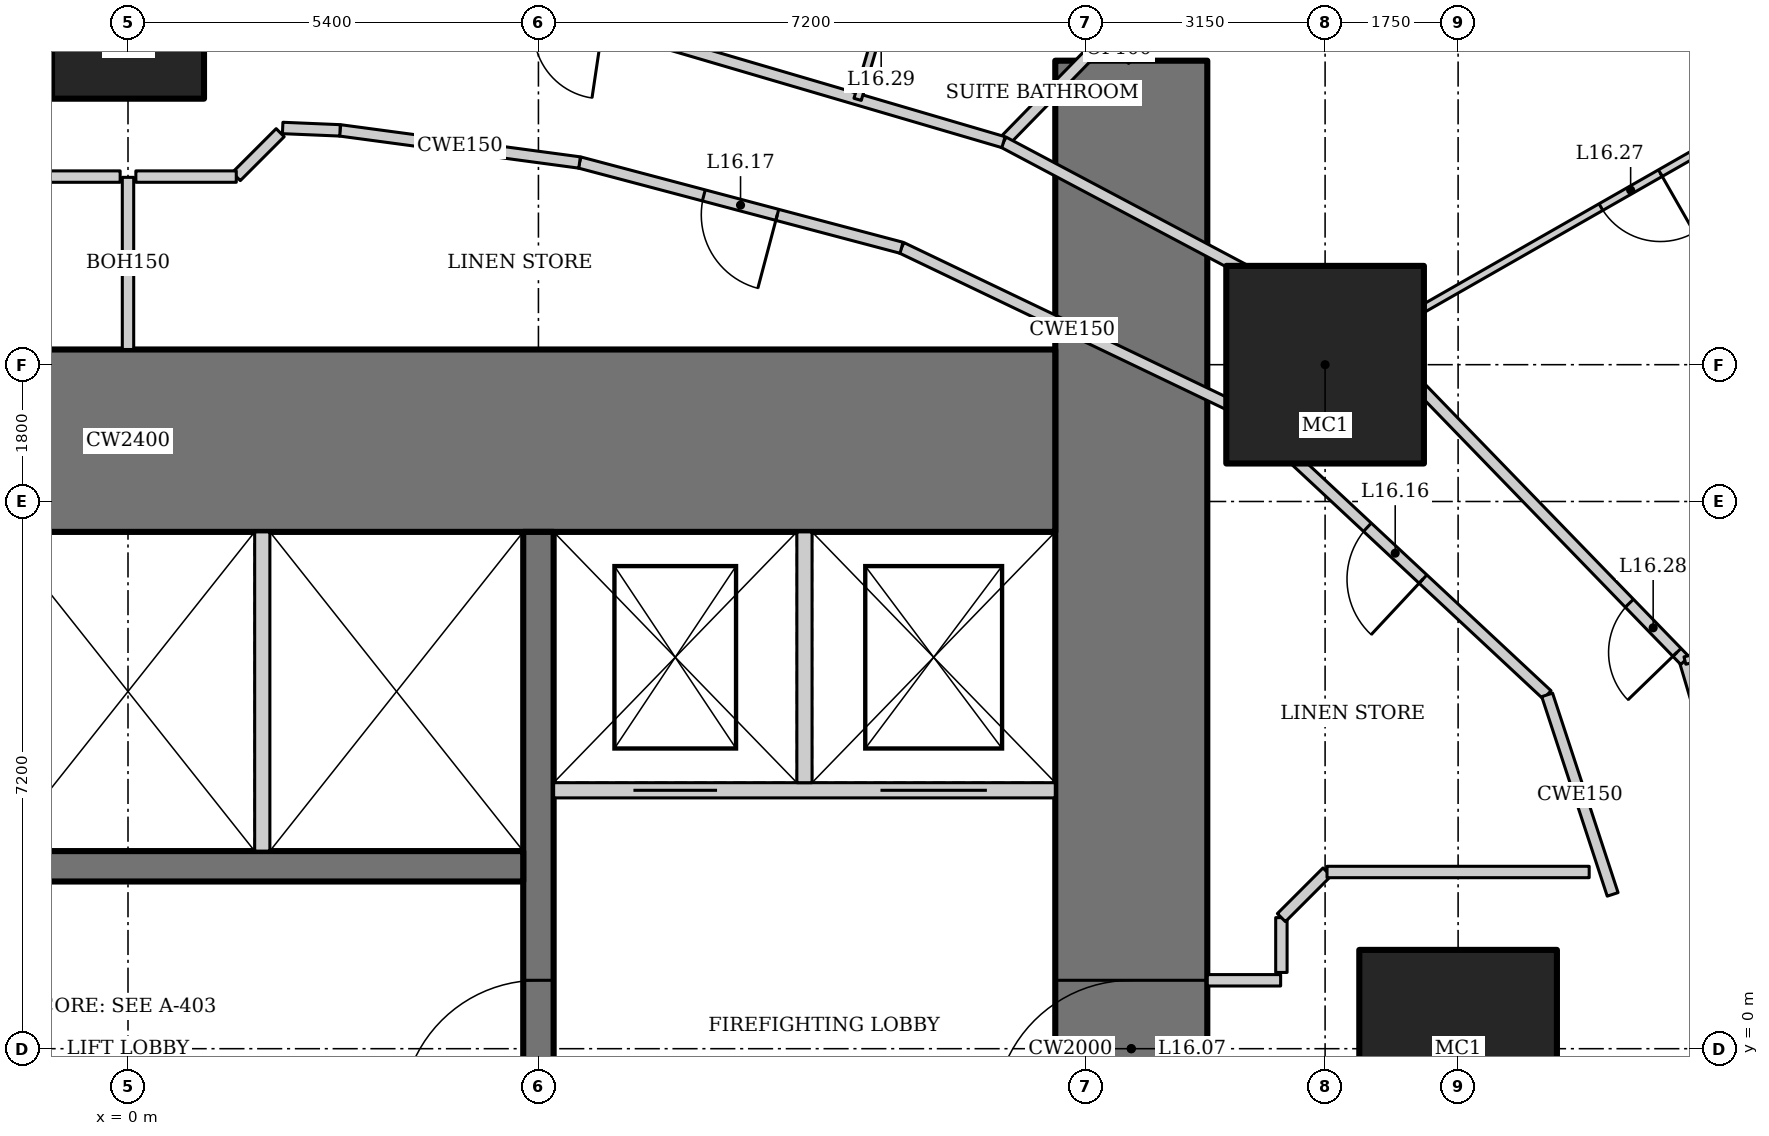
"""IFC4 building model, lengths in metres.
Left out: names, types, materials, properties, quantities, classifications, styles, units other than length and angle.
Written with IfcOpenShell. Run it as: python <this file> out.ifc"""

import sys

from ifc_helpers import new_model, si_unit, direction, frame, frame_2d, origin, origin_2d, place, context, subcontext, project, spatial, rectangle, hollow_rectangle, extrude, element, fill, save


model = new_model("IFC4")
c1 = context("Model", 3, precision=1e-05, world=origin(), true_north=direction((0.0, 1.0)))
c2 = subcontext(c1, "Body", "Model", "MODEL_VIEW")
j1 = project(units=[si_unit("LENGTHUNIT", "METRE"), si_unit("PLANEANGLEUNIT", "RADIAN")], contexts=[c1])
p1 = place(None, origin())
s1 = spatial("IfcSite", under=j1, at=p1, CompositionType="ELEMENT")
p2 = place(p1, origin())
s2 = spatial("IfcBuilding", under=s1, at=p2, CompositionType="ELEMENT")
p3 = place(p2, frame((0.0, 0.0, 73.0)))
s3 = spatial("IfcBuildingStorey", under=s2, at=p3, CompositionType="ELEMENT", Elevation=73.0)
for number, where, z_axis, x_axis in (
    (1, (17.5, 0.0, 0.0), (0.0, 0.0, 1.0), (1.0, 0.0, 0.0)),
    (2, (15.75, 9.0, 0.0), (0.0, 0.0, 1.0), (1.0, 0.0, 0.0)),
):
    element("IfcColumn", number, at=place(p3, frame(where, z_axis=z_axis, x_axis=x_axis)), inside=s3, PredefinedType="COLUMN", context=c2, shape_type="SweptSolid", body=[
        extrude(hollow_rectangle(XDim=2.6, YDim=2.6, WallThickness=0.13, at=origin_2d()), origin(), (0.0, 0.0, 1.0), 3.6),
    ])
p4 = place(p3, frame((0.0, 13.5, 0.0), z_axis=(0.0, 0.0, 1.0), x_axis=(1.0, 0.0, 0.0)))
e3 = element("IfcColumn", 3, at=p4, inside=s3, PredefinedType="COLUMN", context=c2, shape_type="SweptSolid", body=[
    extrude(hollow_rectangle(XDim=2.0, YDim=2.0, WallThickness=0.17, at=origin_2d()), origin(), (0.0, 0.0, 1.0), 3.6),
])
p5 = place(p3, frame((13.2, -13.0, 0.0), z_axis=(0.0, 0.0, 1.0), x_axis=(0.0, 1.0, 0.0)))
e4 = element("IfcWall", 4, at=p5, inside=s3, PredefinedType="SHEAR", context=c2, shape_type="SweptSolid", body=[
    extrude(rectangle(XDim=26.0, YDim=2.0, at=frame_2d((13.0, 0.0))), origin(), (0.0, 0.0, 1.0), 3.6),
])
p6 = place(p5, frame((12.1, 0.0, 0.0)))
e5 = element("IfcOpeningElement", 5, at=p6, cuts=e4, PredefinedType="OPENING", context=c2, shape_type="SweptSolid", body=[
    extrude(rectangle(XDim=1.8, YDim=2.1, at=frame_2d((0.9, 1.05))), frame((0.0, 1.01, 0.0), z_axis=(0.0, -1.0, 0.0), x_axis=(1.0, 0.0, 0.0)), (0.0, 0.0, 1.0), 2.02),
])
p7 = place(p3, frame((12.2, 8.0, 0.0), z_axis=(0.0, 0.0, 1.0), x_axis=(-1.0, 0.0, 0.0)))
e6 = element("IfcWall", 6, at=p7, inside=s3, PredefinedType="SHEAR", context=c2, shape_type="SweptSolid", body=[
    extrude(rectangle(XDim=24.4, YDim=2.4, at=frame_2d((12.2, 0.0))), origin(), (0.0, 0.0, 1.0), 3.6),
])
p8 = place(p3, frame((5.4, -6.8, 0.0), z_axis=(0.0, 0.0, 1.0), x_axis=(0.0, 1.0, 0.0)))
e7 = element("IfcWall", 7, at=p8, inside=s3, PredefinedType="SHEAR", context=c2, shape_type="SweptSolid", body=[
    extrude(rectangle(XDim=13.6, YDim=0.4, at=frame_2d((6.8, 0.0))), origin(), (0.0, 0.0, 1.0), 3.6),
])
p9 = place(p8, frame((5.9, 0.0, 0.0)))
e8 = element("IfcOpeningElement", 8, at=p9, cuts=e7, PredefinedType="OPENING", context=c2, shape_type="SweptSolid", body=[
    extrude(rectangle(XDim=1.8, YDim=2.1, at=frame_2d((0.9, 1.05))), frame((0.0, 0.21, 0.0), z_axis=(0.0, -1.0, 0.0), x_axis=(1.0, 0.0, 0.0)), (0.0, 0.0, 1.0), 0.42),
])
p10 = place(p3, frame((5.2, 2.4, 0.0), z_axis=(0.0, 0.0, 1.0), x_axis=(-1.0, 0.0, 0.0)))
e9 = element("IfcWall", 9, at=p10, inside=s3, PredefinedType="SHEAR", context=c2, shape_type="SweptSolid", body=[
    extrude(rectangle(XDim=10.4, YDim=0.4, at=frame_2d((5.2, 0.0))), origin(), (0.0, 0.0, 1.0), 3.6),
])
p11 = place(p3, frame((1.767, 2.6, 0.0), z_axis=(0.0, 0.0, 1.0), x_axis=(0.0, 1.0, 0.0)))
e10 = element("IfcWall", 10, at=p11, inside=s3, PredefinedType="SOLIDWALL", context=c2, shape_type="SweptSolid", body=[
    extrude(rectangle(XDim=4.2, YDim=0.2, at=frame_2d((2.1, 0.0))), origin(), (0.0, 0.0, 1.0), 3.6),
])
p12 = place(p3, frame((12.2, 3.4, 0.0), z_axis=(0.0, 0.0, 1.0), x_axis=(-1.0, 0.0, 0.0)))
e11 = element("IfcWall", 11, at=p12, inside=s3, PredefinedType="SOLIDWALL", context=c2, shape_type="SweptSolid", body=[
    extrude(rectangle(XDim=6.6, YDim=0.2, at=frame_2d((3.3, 0.0))), origin(), (0.0, 0.0, 1.0), 3.6),
])
p13 = place(p12, frame((4.45, 0.0, 0.0)))
e12 = element("IfcOpeningElement", 12, at=p13, cuts=e11, PredefinedType="OPENING", context=c2, shape_type="SweptSolid", body=[
    extrude(rectangle(XDim=1.1, YDim=2.2, at=frame_2d((0.55, 1.1))), frame((0.0, 0.11, 0.0), z_axis=(0.0, -1.0, 0.0), x_axis=(1.0, 0.0, 0.0)), (0.0, 0.0, 1.0), 0.22),
])
p14 = place(p12, frame((0.9, 0.0, 0.0)))
e13 = element("IfcOpeningElement", 13, at=p14, cuts=e11, PredefinedType="OPENING", context=c2, shape_type="SweptSolid", body=[
    extrude(rectangle(XDim=1.4, YDim=2.2, at=frame_2d((0.7, 1.1))), frame((0.0, 0.11, 0.0), z_axis=(0.0, -1.0, 0.0), x_axis=(1.0, 0.0, 0.0)), (0.0, 0.0, 1.0), 0.22),
])
p15 = place(p3, frame((8.9, 3.5, 0.0), z_axis=(0.0, 0.0, 1.0), x_axis=(0.0, 1.0, 0.0)))
e14 = element("IfcWall", 14, at=p15, inside=s3, PredefinedType="SOLIDWALL", context=c2, shape_type="SweptSolid", body=[
    extrude(rectangle(XDim=3.3, YDim=0.2, at=frame_2d((1.65, 0.0))), origin(), (0.0, 0.0, 1.0), 3.6),
])
p16 = place(p3, frame((17.97, 18.542, 0.0), z_axis=(0.0, 0.0, 1.0), x_axis=(-0.698279935955, -0.715824790743, 0.0)))
e15 = element("IfcWall", 15, at=p16, inside=s3, PredefinedType="PARTITIONING", context=c2, shape_type="SweptSolid", body=[
    extrude(rectangle(XDim=9.24, YDim=0.15, at=frame_2d((4.62, 0.0))), origin(), (0.0, 0.0, 1.0), 2.528),
])
p17 = place(p3, frame((22.0, 0.0, 0.0), z_axis=(0.0, 0.0, 1.0), x_axis=(-0.284584469409, 0.95865096869, 0.0)))
e16 = element("IfcWall", 16, at=p17, inside=s3, PredefinedType="PARTITIONING", context=c2, shape_type="SweptSolid", body=[
    extrude(rectangle(XDim=5.327, YDim=0.15, at=frame_2d((2.664, 0.0))), origin(), (0.0, 0.0, 1.0), 3.45),
])
p18 = place(p3, frame((20.484, 5.107, 0.0), z_axis=(0.0, 0.0, 1.0), x_axis=(-0.695871090686, 0.71816671125, 0.0)))
e17 = element("IfcWall", 17, at=p18, inside=s3, PredefinedType="PARTITIONING", context=c2, shape_type="SweptSolid", body=[
    extrude(rectangle(XDim=5.913, YDim=0.15, at=frame_2d((2.957, 0.0))), origin(), (0.0, 0.0, 1.0), 3.45),
])
p19 = place(p18, frame((0.15, 0.0, 0.0)))
e18 = element("IfcOpeningElement", 18, at=p19, cuts=e17, PredefinedType="OPENING", context=c2, shape_type="SweptSolid", body=[
    extrude(rectangle(XDim=0.9, YDim=2.1, at=frame_2d((0.45, 1.05))), frame((0.0, 0.085, 0.0), z_axis=(0.0, -1.0, 0.0), x_axis=(1.0, 0.0, 0.0)), (0.0, 0.0, 1.0), 0.17),
])
p20 = place(p3, frame((16.369, 9.354, 0.0), z_axis=(0.0, 0.0, 1.0), x_axis=(-0.883334368785, 0.468743419071, 0.0)))
e19 = element("IfcWall", 19, at=p20, inside=s3, PredefinedType="PARTITIONING", context=c2, shape_type="SweptSolid", body=[
    extrude(rectangle(XDim=5.491, YDim=0.15, at=frame_2d((2.746, 0.0))), origin(), (0.0, 0.0, 1.0), 3.45),
])
p21 = place(p3, frame((11.519, 11.928, 0.0), z_axis=(0.0, 0.0, 1.0), x_axis=(-0.959496227294, 0.281721475589, 0.0)))
e20 = element("IfcWall", 20, at=p21, inside=s3, PredefinedType="PARTITIONING", context=c2, shape_type="SweptSolid", body=[
    extrude(rectangle(XDim=4.933, YDim=0.15, at=frame_2d((2.466, 0.0))), origin(), (0.0, 0.0, 1.0), 3.45),
])
p22 = place(p3, frame((20.484, -5.107, 0.0), z_axis=(0.0, 0.0, 1.0), x_axis=(0.284584469409, 0.95865096869, 0.0)))
e21 = element("IfcWall", 21, at=p22, inside=s3, PredefinedType="PARTITIONING", context=c2, shape_type="SweptSolid", body=[
    extrude(rectangle(XDim=5.327, YDim=0.15, at=frame_2d((2.664, 0.0))), origin(), (0.0, 0.0, 1.0), 3.45),
])
p23 = place(p22, frame((4.278, 0.0, 0.0)))
e22 = element("IfcOpeningElement", 22, at=p23, cuts=e21, PredefinedType="OPENING", context=c2, shape_type="SweptSolid", body=[
    extrude(rectangle(XDim=0.9, YDim=2.1, at=frame_2d((0.45, 1.05))), frame((0.0, 0.085, 0.0), z_axis=(0.0, -1.0, 0.0), x_axis=(1.0, 0.0, 0.0)), (0.0, 0.0, 1.0), 0.17),
])
p24 = place(p3, frame((18.672, 4.655, 0.0), z_axis=(0.0, 0.0, 1.0), x_axis=(-0.731260145007, 0.682098673452, 0.0)))
e23 = element("IfcWall", 23, at=p24, inside=s3, PredefinedType="PARTITIONING", context=c2, shape_type="SweptSolid", body=[
    extrude(rectangle(XDim=5.468, YDim=0.15, at=frame_2d((2.734, 0.0))), origin(), (0.0, 0.0, 1.0), 3.45),
])
p25 = place(p24, frame((2.234, 0.0, 0.0)))
e24 = element("IfcOpeningElement", 24, at=p25, cuts=e23, PredefinedType="OPENING", context=c2, shape_type="SweptSolid", body=[
    extrude(rectangle(XDim=1.0, YDim=2.1, at=frame_2d((0.5, 1.05))), frame((0.0, 0.085, 0.0), z_axis=(0.0, -1.0, 0.0), x_axis=(1.0, 0.0, 0.0)), (0.0, 0.0, 1.0), 0.17),
])
p26 = place(p3, frame((14.673, 8.385, 0.0), z_axis=(0.0, 0.0, 1.0), x_axis=(-0.901869692799, 0.43200816799, 0.0)))
e25 = element("IfcWall", 25, at=p26, inside=s3, PredefinedType="PARTITIONING", context=c2, shape_type="SweptSolid", body=[
    extrude(rectangle(XDim=4.986, YDim=0.15, at=frame_2d((2.493, 0.0))), origin(), (0.0, 0.0, 1.0), 3.45),
])
p27 = place(p3, frame((10.177, 10.539, 0.0), z_axis=(0.0, 0.0, 1.0), x_axis=(-0.966672790407, 0.256015070428, 0.0)))
e26 = element("IfcWall", 26, at=p27, inside=s3, PredefinedType="PARTITIONING", context=c2, shape_type="SweptSolid", body=[
    extrude(rectangle(XDim=4.382, YDim=0.15, at=frame_2d((2.191, 0.0))), origin(), (0.0, 0.0, 1.0), 3.45),
])
p28 = place(p27, frame((1.691, 0.0, 0.0)))
e27 = element("IfcOpeningElement", 27, at=p28, cuts=e26, PredefinedType="OPENING", context=c2, shape_type="SweptSolid", body=[
    extrude(rectangle(XDim=1.0, YDim=2.1, at=frame_2d((0.5, 1.05))), frame((0.0, 0.085, 0.0), z_axis=(0.0, -1.0, 0.0), x_axis=(1.0, 0.0, 0.0)), (0.0, 0.0, 1.0), 0.17),
])
p29 = place(p3, frame((5.941, 11.66, 0.0), z_axis=(0.0, 0.0, 1.0), x_axis=(-0.991129053928, 0.13290296633, 0.0)))
e28 = element("IfcWall", 28, at=p29, inside=s3, PredefinedType="PARTITIONING", context=c2, shape_type="SweptSolid", body=[
    extrude(rectangle(XDim=3.18, YDim=0.15, at=frame_2d((1.59, 0.0))), origin(), (0.0, 0.0, 1.0), 3.45),
])
p30 = place(p3, frame((27.833, 6.939, 0.0), z_axis=(0.0, 0.0, 1.0), x_axis=(-0.970295894358, -0.24192122146, 0.0)))
e29 = element("IfcWall", 29, at=p30, inside=s3, PredefinedType="PARTITIONING", context=c2, shape_type="SweptSolid", body=[
    extrude(rectangle(XDim=7.574, YDim=0.1, at=frame_2d((3.787, 0.0))), origin(), (0.0, 0.0, 1.0), 2.333),
])
p31 = place(p30, frame((3.337, 0.0, 0.0)))
e30 = element("IfcOpeningElement", 30, at=p31, cuts=e29, PredefinedType="OPENING", context=c2, shape_type="SweptSolid", body=[
    extrude(rectangle(XDim=0.9, YDim=2.1, at=frame_2d((0.45, 1.05))), frame((0.0, 0.06, 0.0), z_axis=(0.0, -1.0, 0.0), x_axis=(1.0, 0.0, 0.0)), (0.0, 0.0, 1.0), 0.12),
])
p32 = place(p3, frame((23.171, 13.24, 0.0), z_axis=(0.0, 0.0, 1.0), x_axis=(-0.868243142124, -0.496138938357, 0.0)))
e31 = element("IfcWall", 31, at=p32, inside=s3, PredefinedType="PARTITIONING", context=c2, shape_type="SweptSolid", body=[
    extrude(rectangle(XDim=7.834, YDim=0.1, at=frame_2d((3.917, 0.0))), origin(), (0.0, 0.0, 1.0), 2.693),
])
p33 = place(p32, frame((3.467, 0.0, 0.0)))
e32 = element("IfcOpeningElement", 32, at=p33, cuts=e31, PredefinedType="OPENING", context=c2, shape_type="SweptSolid", body=[
    extrude(rectangle(XDim=0.9, YDim=2.1, at=frame_2d((0.45, 1.05))), frame((0.0, 0.06, 0.0), z_axis=(0.0, -1.0, 0.0), x_axis=(1.0, 0.0, 0.0)), (0.0, 0.0, 1.0), 0.12),
])
p34 = place(p3, frame((9.6, 12.491, 0.0), z_axis=(0.0, 0.0, 1.0), x_axis=(0.281687126576, 0.959506311976, 0.0)))
e33 = element("IfcWall", 33, at=p34, inside=s3, PredefinedType="PARTITIONING", context=c2, shape_type="SweptSolid", body=[
    extrude(rectangle(XDim=2.4, YDim=0.1, at=frame_2d((1.2, 0.0))), origin(), (0.0, 0.0, 1.0), 3.45),
])
p35 = place(p34, frame((0.7, 0.0, 0.0)))
e34 = element("IfcOpeningElement", 34, at=p35, cuts=e33, PredefinedType="OPENING", context=c2, shape_type="SweptSolid", body=[
    extrude(rectangle(XDim=0.8, YDim=2.1, at=frame_2d((0.4, 1.05))), frame((0.0, 0.06, 0.0), z_axis=(0.0, -1.0, 0.0), x_axis=(1.0, 0.0, 0.0)), (0.0, 0.0, 1.0), 0.12),
])
p36 = place(p3, frame((13.2, 13.0, 0.0), z_axis=(0.0, 0.0, 1.0), x_axis=(-0.715906247499, 0.698196422786, 0.0)))
e35 = element("IfcWall", 35, at=p36, inside=s3, PredefinedType="PARTITIONING", context=c2, shape_type="SweptSolid", body=[
    extrude(rectangle(XDim=0.455, YDim=0.1, at=frame_2d((0.228, 0.0))), origin(), (0.0, 0.0, 1.0), 3.45),
])
p37 = place(p3, frame((2.79, 12.083, 0.0), z_axis=(0.0, 0.0, 1.0), x_axis=(-0.999116751279, 0.042020439232, 0.0)))
e36 = element("IfcWall", 36, at=p37, inside=s3, PredefinedType="PARTITIONING", context=c2, shape_type="SweptSolid", body=[
    extrude(rectangle(XDim=0.755, YDim=0.15, at=frame_2d((0.378, 0.0))), origin(), (0.0, 0.0, 1.0), 3.45),
])
p38 = place(p3, frame((0.0, 9.2, 0.0), z_axis=(0.0, 0.0, 1.0), x_axis=(0.0, 1.0, 0.0)))
e37 = element("IfcWall", 37, at=p38, inside=s3, PredefinedType="PARTITIONING", context=c2, shape_type="SweptSolid", body=[
    extrude(rectangle(XDim=2.265, YDim=0.15, at=frame_2d((1.133, 0.0))), origin(), (0.0, 0.0, 1.0), 3.044),
])
p39 = place(p3, frame((2.002, 12.053, 0.0), z_axis=(0.0, 0.0, 1.0), x_axis=(-0.707256164678, -0.706957366129, 0.0)))
e38 = element("IfcWall", 38, at=p39, inside=s3, PredefinedType="PARTITIONING", context=c2, shape_type="SweptSolid", body=[
    extrude(rectangle(XDim=0.817, YDim=0.15, at=frame_2d((0.409, 0.0))), origin(), (0.0, 0.0, 1.0), 3.45),
])
for number, where, z_axis, x_axis in (
    (39, (1.425, 11.475, 0.0), (0.0, 0.0, 1.0), (-1.0, 0.0, 0.0)),
    (40, (-0.103, 11.475, 0.0), (0.0, 0.0, 1.0), (-1.0, 0.0, 0.0)),
):
    element("IfcWall", number, at=place(p3, frame(where, z_axis=z_axis, x_axis=x_axis)), inside=s3, PredefinedType="PARTITIONING", context=c2, shape_type="SweptSolid", body=[
        extrude(rectangle(XDim=1.321, YDim=0.15, at=frame_2d((0.661, 0.0))), origin(), (0.0, 0.0, 1.0), 3.45),
    ])
p40 = place(p3, frame((19.533, 2.03, 0.0), z_axis=(0.0, 0.0, 1.0), x_axis=(-0.311929965981, 0.950105097515, 0.0)))
e41 = element("IfcWall", 41, at=p40, inside=s3, PredefinedType="PARTITIONING", context=c2, shape_type="SweptSolid", body=[
    extrude(rectangle(XDim=2.763, YDim=0.15, at=frame_2d((1.381, 0.0))), origin(), (0.0, 0.0, 1.0), 3.45),
])
p41 = place(p3, frame((14.2, 0.9, 0.0), z_axis=(0.0, 0.0, 1.0), x_axis=(1.0, 0.0, 0.0)))
e42 = element("IfcWall", 42, at=p41, inside=s3, PredefinedType="PARTITIONING", context=c2, shape_type="SweptSolid", body=[
    extrude(rectangle(XDim=0.965, YDim=0.15, at=frame_2d((0.482, 0.0))), origin(), (0.0, 0.0, 1.0), 3.45),
])
p42 = place(p3, frame((15.175, 1.003, 0.0), z_axis=(0.0, 0.0, 1.0), x_axis=(0.0, 1.0, 0.0)))
e43 = element("IfcWall", 43, at=p42, inside=s3, PredefinedType="PARTITIONING", context=c2, shape_type="SweptSolid", body=[
    extrude(rectangle(XDim=0.721, YDim=0.15, at=frame_2d((0.361, 0.0))), origin(), (0.0, 0.0, 1.0), 3.45),
])
p43 = place(p3, frame((15.175, 1.725, 0.0), z_axis=(0.0, 0.0, 1.0), x_axis=(0.707106781187, 0.707106781187, 0.0)))
e44 = element("IfcWall", 44, at=p43, inside=s3, PredefinedType="PARTITIONING", context=c2, shape_type="SweptSolid", body=[
    extrude(rectangle(XDim=0.849, YDim=0.15, at=frame_2d((0.425, 0.0))), origin(), (0.0, 0.0, 1.0), 3.45),
])
p44 = place(p3, frame((15.775, 2.325, 0.0), z_axis=(0.0, 0.0, 1.0), x_axis=(1.0, 0.0, 0.0)))
e45 = element("IfcWall", 45, at=p44, inside=s3, PredefinedType="PARTITIONING", context=c2, shape_type="SweptSolid", body=[
    extrude(rectangle(XDim=3.449, YDim=0.15, at=frame_2d((1.725, 0.0))), origin(), (0.0, 0.0, 1.0), 3.45),
])
p45 = place(p9, origin())
e46 = element("IfcDoor", 46, at=p45, inside=s3, OperationType="DOUBLE_DOOR_DOUBLE_SWING", PredefinedType="DOOR", context=c2, shape_type="SweptSolid", body=[
    extrude(rectangle(XDim=1.8, YDim=2.1, at=frame_2d((0.9, 1.05))), frame((0.0, 0.025, 0.0), z_axis=(0.0, -1.0, 0.0), x_axis=(1.0, 0.0, 0.0)), (0.0, 0.0, 1.0), 0.05),
])
fill(e8, e46)
p46 = place(p6, origin())
e47 = element("IfcDoor", 47, at=p46, inside=s3, OperationType="DOUBLE_DOOR_DOUBLE_SWING", PredefinedType="DOOR", context=c2, shape_type="SweptSolid", body=[
    extrude(rectangle(XDim=1.8, YDim=2.1, at=frame_2d((0.9, 1.05))), frame((0.0, 0.025, 0.0), z_axis=(0.0, -1.0, 0.0), x_axis=(1.0, 0.0, 0.0)), (0.0, 0.0, 1.0), 0.05),
])
fill(e5, e47)
p47 = place(p13, origin())
e48 = element("IfcDoor", 48, at=p47, inside=s3, OperationType="DOUBLE_DOOR_SLIDING", PredefinedType="DOOR", context=c2, shape_type="SweptSolid", body=[
    extrude(rectangle(XDim=1.1, YDim=2.2, at=frame_2d((0.55, 1.1))), frame((0.0, 0.025, 0.0), z_axis=(0.0, -1.0, 0.0), x_axis=(1.0, 0.0, 0.0)), (0.0, 0.0, 1.0), 0.05),
])
fill(e12, e48)
p48 = place(p14, origin())
e49 = element("IfcDoor", 49, at=p48, inside=s3, OperationType="DOUBLE_DOOR_SLIDING", PredefinedType="DOOR", context=c2, shape_type="SweptSolid", body=[
    extrude(rectangle(XDim=1.4, YDim=2.2, at=frame_2d((0.7, 1.1))), frame((0.0, 0.025, 0.0), z_axis=(0.0, -1.0, 0.0), x_axis=(1.0, 0.0, 0.0)), (0.0, 0.0, 1.0), 0.05),
])
fill(e13, e49)
p49 = place(p25, origin())
e50 = element("IfcDoor", 50, at=p49, inside=s3, OperationType="SINGLE_SWING_LEFT", PredefinedType="DOOR", context=c2, shape_type="SweptSolid", body=[
    extrude(rectangle(XDim=1.0, YDim=2.1, at=frame_2d((0.5, 1.05))), frame((0.0, 0.025, 0.0), z_axis=(0.0, -1.0, 0.0), x_axis=(1.0, 0.0, 0.0)), (0.0, 0.0, 1.0), 0.05),
])
fill(e24, e50)
p50 = place(p28, origin())
e51 = element("IfcDoor", 51, at=p50, inside=s3, OperationType="SINGLE_SWING_LEFT", PredefinedType="DOOR", context=c2, shape_type="SweptSolid", body=[
    extrude(rectangle(XDim=1.0, YDim=2.1, at=frame_2d((0.5, 1.05))), frame((0.0, 0.025, 0.0), z_axis=(0.0, -1.0, 0.0), x_axis=(1.0, 0.0, 0.0)), (0.0, 0.0, 1.0), 0.05),
])
fill(e27, e51)
p51 = place(p33, origin())
e52 = element("IfcDoor", 52, at=p51, inside=s3, OperationType="SINGLE_SWING_LEFT", PredefinedType="DOOR", context=c2, shape_type="SweptSolid", body=[
    extrude(rectangle(XDim=0.9, YDim=2.1, at=frame_2d((0.45, 1.05))), frame((0.0, 0.025, 0.0), z_axis=(0.0, -1.0, 0.0), x_axis=(1.0, 0.0, 0.0)), (0.0, 0.0, 1.0), 0.05),
])
fill(e32, e52)
p52 = place(p19, origin())
e53 = element("IfcDoor", 53, at=p52, inside=s3, OperationType="SINGLE_SWING_LEFT", PredefinedType="DOOR", context=c2, shape_type="SweptSolid", body=[
    extrude(rectangle(XDim=0.9, YDim=2.1, at=frame_2d((0.45, 1.05))), frame((0.0, 0.025, 0.0), z_axis=(0.0, -1.0, 0.0), x_axis=(1.0, 0.0, 0.0)), (0.0, 0.0, 1.0), 0.05),
])
fill(e18, e53)
save(model, sys.argv[1])
